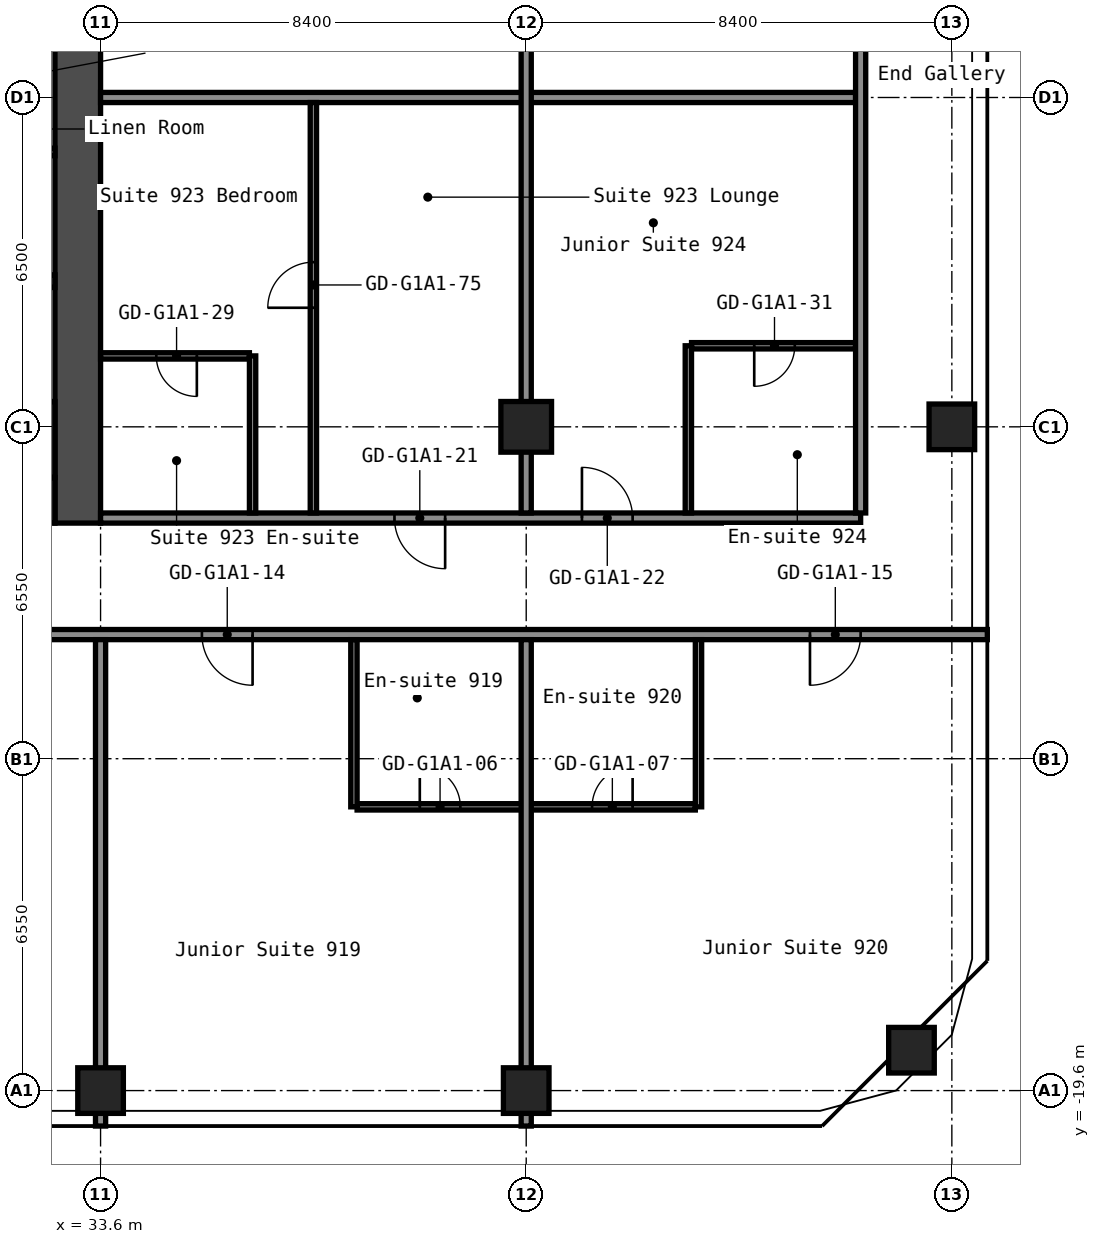
"""IFC4 building model, lengths in metres.
Left out: names, types, materials, properties, quantities, classifications, styles, units other than length and angle.
Written with IfcOpenShell. Run it as: python <this file> out.ifc"""

import sys

from ifc_helpers import new_model, si_unit, direction, frame, frame_2d, origin, origin_2d, place, context, subcontext, project, spatial, rectangle, hollow_rectangle, extrude, element, fill, save


model = new_model("IFC4")
c1 = context("Model", 3, precision=1e-05, world=origin(), true_north=direction((0.0, 1.0)))
c2 = subcontext(c1, "Body", "Model", "MODEL_VIEW")
j1 = project(units=[si_unit("LENGTHUNIT", "METRE"), si_unit("PLANEANGLEUNIT", "RADIAN")], contexts=[c1])
p1 = place(None, origin())
s1 = spatial("IfcSite", under=j1, at=p1, CompositionType="ELEMENT")
p2 = place(p1, origin())
s2 = spatial("IfcBuilding", under=s1, at=p2, CompositionType="ELEMENT")
p3 = place(p2, frame((0.0, 0.0, 35.8)))
s3 = spatial("IfcBuildingStorey", under=s2, at=p3, CompositionType="ELEMENT", Elevation=35.8)
for number, where, z_axis, x_axis in (
    (1, (33.6, -19.6, 0.0), (0.0, 0.0, 1.0), (1.0, 0.0, 0.0)),
    (2, (42.0, -19.6, 0.0), (0.0, 0.0, 1.0), (1.0, 0.0, 0.0)),
):
    element("IfcColumn", number, at=place(p3, frame(where, z_axis=z_axis, x_axis=x_axis)), inside=s3, PredefinedType="COLUMN", context=c2, shape_type="SweptSolid", body=[
        extrude(hollow_rectangle(XDim=0.9, YDim=0.9, WallThickness=0.036, at=origin_2d()), origin(), (0.0, 0.0, 1.0), 2.8),
    ])
p4 = place(p3, frame((42.0, -6.5, 0.0), z_axis=(0.0, 0.0, 1.0), x_axis=(1.0, 0.0, 0.0)))
e3 = element("IfcColumn", 3, at=p4, inside=s3, PredefinedType="COLUMN", context=c2, shape_type="SweptSolid", body=[
    extrude(hollow_rectangle(XDim=1.0, YDim=1.0, WallThickness=0.04, at=origin_2d()), origin(), (0.0, 0.0, 1.0), 2.8),
])
for number, where, z_axis, x_axis in (
    (4, (49.603, -18.803, 0.0), (0.0, 0.0, 1.0), (1.0, 0.0, 0.0)),
    (5, (50.4, -6.5, 0.0), (0.0, 0.0, 1.0), (1.0, 0.0, 0.0)),
):
    element("IfcColumn", number, at=place(p3, frame(where, z_axis=z_axis, x_axis=x_axis)), inside=s3, PredefinedType="COLUMN", context=c2, shape_type="SweptSolid", body=[
        extrude(hollow_rectangle(XDim=0.9, YDim=0.9, WallThickness=0.036, at=origin_2d()), origin(), (0.0, 0.0, 1.0), 2.8),
    ])
p5 = place(p3, frame((33.15, -8.4, 0.0), z_axis=(0.0, 0.0, 1.0), x_axis=(0.0, 1.0, 0.0)))
e6 = element("IfcWall", 6, at=p5, inside=s3, PredefinedType="SHEAR", context=c2, shape_type="SweptSolid", body=[
    extrude(rectangle(XDim=16.8, YDim=0.9, at=frame_2d((8.4, 0.0))), origin(), (0.0, 0.0, 1.0), 2.8),
])
p6 = place(p3, frame((17.7, -7.95, 0.0), z_axis=(0.0, 0.0, 1.0), x_axis=(1.0, 0.0, 0.0)))
e7 = element("IfcWall", 7, at=p6, inside=s3, PredefinedType="SHEAR", context=c2, shape_type="SweptSolid", body=[
    extrude(rectangle(XDim=15.0, YDim=0.9, at=frame_2d((7.5, 0.0))), origin(), (0.0, 0.0, 1.0), 2.8),
])
p7 = place(p6, frame((2.55, 0.0, 0.0)))
e8 = element("IfcOpeningElement", 8, at=p7, cuts=e7, PredefinedType="OPENING", context=c2, shape_type="SweptSolid", body=[
    extrude(rectangle(XDim=1.0, YDim=2.1, at=frame_2d((0.5, 1.05))), frame((0.0, 0.46, 0.0), z_axis=(0.0, -1.0, 0.0), x_axis=(1.0, 0.0, 0.0)), (0.0, 0.0, 1.0), 0.92),
])
p8 = place(p3, frame((28.15, -3.625, 0.0), z_axis=(0.0, 0.0, 1.0), x_axis=(1.0, 0.0, 0.0)))
e9 = element("IfcWall", 9, at=p8, inside=s3, PredefinedType="SHEAR", context=c2, shape_type="SweptSolid", body=[
    extrude(rectangle(XDim=4.55, YDim=0.25, at=frame_2d((2.275, 0.0))), origin(), (0.0, 0.0, 1.0), 2.8),
])
p9 = place(p3, frame((28.15, -6.75, 0.0), z_axis=(0.0, 0.0, 1.0), x_axis=(1.0, 0.0, 0.0)))
e10 = element("IfcWall", 10, at=p9, inside=s3, PredefinedType="SHEAR", context=c2, shape_type="SweptSolid", body=[
    extrude(rectangle(XDim=4.55, YDim=1.5, at=frame_2d((2.275, 0.0))), origin(), (0.0, 0.0, 1.0), 2.8),
])
p10 = place(p3, frame((29.7, -1.075, 0.0), z_axis=(0.0, 0.0, 1.0), x_axis=(1.0, 0.0, 0.0)))
e11 = element("IfcWall", 11, at=p10, inside=s3, PredefinedType="PARTITIONING", context=c2, shape_type="SweptSolid", body=[
    extrude(rectangle(XDim=3.0, YDim=0.15, at=frame_2d((1.5, 0.0))), origin(), (0.0, 0.0, 1.0), 2.8),
])
p11 = place(p3, frame((38.663, -14.0, 0.0), z_axis=(0.0, 0.0, 1.0), x_axis=(1.0, 0.0, 0.0)))
e12 = element("IfcWall", 12, at=p11, inside=s3, PredefinedType="PARTITIONING", context=c2, shape_type="SweptSolid", body=[
    extrude(rectangle(XDim=6.675, YDim=0.125, at=frame_2d((3.337, 0.0))), origin(), (0.0, 0.0, 1.0), 2.8),
])
p12 = place(p11, frame((1.238, 0.0, 0.0)))
e13 = element("IfcOpeningElement", 13, at=p12, cuts=e12, PredefinedType="OPENING", context=c2, shape_type="SweptSolid", body=[
    extrude(rectangle(XDim=0.8, YDim=2.1, at=frame_2d((0.4, 1.05))), frame((0.0, 0.073, 0.0), z_axis=(0.0, -1.0, 0.0), x_axis=(1.0, 0.0, 0.0)), (0.0, 0.0, 1.0), 0.145),
])
p13 = place(p11, frame((4.637, 0.0, 0.0)))
e14 = element("IfcOpeningElement", 14, at=p13, cuts=e12, PredefinedType="OPENING", context=c2, shape_type="SweptSolid", body=[
    extrude(rectangle(XDim=0.8, YDim=2.1, at=frame_2d((0.4, 1.05))), frame((0.0, 0.073, 0.0), z_axis=(0.0, -1.0, 0.0), x_axis=(1.0, 0.0, 0.0)), (0.0, 0.0, 1.0), 0.145),
])
p14 = place(p3, frame((16.8, -10.6, 0.0), z_axis=(0.0, 0.0, 1.0), x_axis=(1.0, 0.0, 0.0)))
e15 = element("IfcWall", 15, at=p14, inside=s3, PredefinedType="PARTITIONING", context=c2, shape_type="SweptSolid", body=[
    extrude(rectangle(XDim=34.3, YDim=0.2, at=frame_2d((17.15, 0.0))), origin(), (0.0, 0.0, 1.0), 2.8),
])
p15 = place(p14, frame((5.4, 0.0, 0.0)))
e16 = element("IfcOpeningElement", 16, at=p15, cuts=e15, PredefinedType="OPENING", context=c2, shape_type="SweptSolid", body=[
    extrude(rectangle(XDim=1.0, YDim=2.1, at=frame_2d((0.5, 1.05))), frame((0.0, 0.11, 0.0), z_axis=(0.0, -1.0, 0.0), x_axis=(1.0, 0.0, 0.0)), (0.0, 0.0, 1.0), 0.22),
])
p16 = place(p14, frame((13.8, 0.0, 0.0)))
e17 = element("IfcOpeningElement", 17, at=p16, cuts=e15, PredefinedType="OPENING", context=c2, shape_type="SweptSolid", body=[
    extrude(rectangle(XDim=1.0, YDim=2.1, at=frame_2d((0.5, 1.05))), frame((0.0, 0.11, 0.0), z_axis=(0.0, -1.0, 0.0), x_axis=(1.0, 0.0, 0.0)), (0.0, 0.0, 1.0), 0.22),
])
p17 = place(p14, frame((18.8, 0.0, 0.0)))
e18 = element("IfcOpeningElement", 18, at=p17, cuts=e15, PredefinedType="OPENING", context=c2, shape_type="SweptSolid", body=[
    extrude(rectangle(XDim=1.0, YDim=2.1, at=frame_2d((0.5, 1.05))), frame((0.0, 0.11, 0.0), z_axis=(0.0, -1.0, 0.0), x_axis=(1.0, 0.0, 0.0)), (0.0, 0.0, 1.0), 0.22),
])
p18 = place(p14, frame((30.8, 0.0, 0.0)))
e19 = element("IfcOpeningElement", 19, at=p18, cuts=e15, PredefinedType="OPENING", context=c2, shape_type="SweptSolid", body=[
    extrude(rectangle(XDim=1.0, YDim=2.1, at=frame_2d((0.5, 1.05))), frame((0.0, 0.11, 0.0), z_axis=(0.0, -1.0, 0.0), x_axis=(1.0, 0.0, 0.0)), (0.0, 0.0, 1.0), 0.22),
])
p19 = place(p3, frame((33.6, -8.3, 0.0), z_axis=(0.0, 0.0, 1.0), x_axis=(1.0, 0.0, 0.0)))
e20 = element("IfcWall", 20, at=p19, inside=s3, PredefinedType="PARTITIONING", context=c2, shape_type="SweptSolid", body=[
    extrude(rectangle(XDim=15.0, YDim=0.2, at=frame_2d((7.5, 0.0))), origin(), (0.0, 0.0, 1.0), 2.8),
])
p20 = place(p19, frame((5.8, 0.0, 0.0)))
e21 = element("IfcOpeningElement", 21, at=p20, cuts=e20, PredefinedType="OPENING", context=c2, shape_type="SweptSolid", body=[
    extrude(rectangle(XDim=1.0, YDim=2.1, at=frame_2d((0.5, 1.05))), frame((0.0, 0.11, 0.0), z_axis=(0.0, -1.0, 0.0), x_axis=(1.0, 0.0, 0.0)), (0.0, 0.0, 1.0), 0.22),
])
p21 = place(p19, frame((9.5, 0.0, 0.0)))
e22 = element("IfcOpeningElement", 22, at=p21, cuts=e20, PredefinedType="OPENING", context=c2, shape_type="SweptSolid", body=[
    extrude(rectangle(XDim=1.0, YDim=2.1, at=frame_2d((0.5, 1.05))), frame((0.0, 0.11, 0.0), z_axis=(0.0, -1.0, 0.0), x_axis=(1.0, 0.0, 0.0)), (0.0, 0.0, 1.0), 0.22),
])
p22 = place(p3, frame((33.6, -5.1, 0.0), z_axis=(0.0, 0.0, 1.0), x_axis=(1.0, 0.0, 0.0)))
e23 = element("IfcWall", 23, at=p22, inside=s3, PredefinedType="PARTITIONING", context=c2, shape_type="SweptSolid", body=[
    extrude(rectangle(XDim=2.938, YDim=0.125, at=frame_2d((1.469, 0.0))), origin(), (0.0, 0.0, 1.0), 2.8),
])
p23 = place(p22, frame((1.1, 0.0, 0.0)))
e24 = element("IfcOpeningElement", 24, at=p23, cuts=e23, PredefinedType="OPENING", context=c2, shape_type="SweptSolid", body=[
    extrude(rectangle(XDim=0.8, YDim=2.1, at=frame_2d((0.4, 1.05))), frame((0.0, 0.073, 0.0), z_axis=(0.0, -1.0, 0.0), x_axis=(1.0, 0.0, 0.0)), (0.0, 0.0, 1.0), 0.145),
])
p24 = place(p3, frame((45.262, -4.9, 0.0), z_axis=(0.0, 0.0, 1.0), x_axis=(1.0, 0.0, 0.0)))
e25 = element("IfcWall", 25, at=p24, inside=s3, PredefinedType="PARTITIONING", context=c2, shape_type="SweptSolid", body=[
    extrude(rectangle(XDim=3.238, YDim=0.125, at=frame_2d((1.619, 0.0))), origin(), (0.0, 0.0, 1.0), 2.8),
])
p25 = place(p24, frame((1.238, 0.0, 0.0)))
e26 = element("IfcOpeningElement", 26, at=p25, cuts=e25, PredefinedType="OPENING", context=c2, shape_type="SweptSolid", body=[
    extrude(rectangle(XDim=0.8, YDim=2.1, at=frame_2d((0.4, 1.05))), frame((0.0, 0.073, 0.0), z_axis=(0.0, -1.0, 0.0), x_axis=(1.0, 0.0, 0.0)), (0.0, 0.0, 1.0), 0.145),
])
p26 = place(p3, frame((33.6, 0.0, 0.0), z_axis=(0.0, 0.0, 1.0), x_axis=(1.0, 0.0, 0.0)))
e27 = element("IfcWall", 27, at=p26, inside=s3, PredefinedType="PARTITIONING", context=c2, shape_type="SweptSolid", body=[
    extrude(rectangle(XDim=14.9, YDim=0.2, at=frame_2d((7.45, 0.0))), origin(), (0.0, 0.0, 1.0), 2.8),
])
p27 = place(p3, frame((33.6, -20.3, 0.0), z_axis=(0.0, 0.0, 1.0), x_axis=(0.0, 1.0, 0.0)))
e28 = element("IfcWall", 28, at=p27, inside=s3, PredefinedType="PARTITIONING", context=c2, shape_type="SweptSolid", body=[
    extrude(rectangle(XDim=9.6, YDim=0.2, at=frame_2d((4.8, 0.0))), origin(), (0.0, 0.0, 1.0), 2.8),
])
p28 = place(p3, frame((36.6, -8.2, 0.0), z_axis=(0.0, 0.0, 1.0), x_axis=(0.0, 1.0, 0.0)))
e29 = element("IfcWall", 29, at=p28, inside=s3, PredefinedType="PARTITIONING", context=c2, shape_type="SweptSolid", body=[
    extrude(rectangle(XDim=3.1, YDim=0.125, at=frame_2d((1.55, 0.0))), origin(), (0.0, 0.0, 1.0), 2.8),
])
p29 = place(p3, frame((37.8, -8.2, 0.0), z_axis=(0.0, 0.0, 1.0), x_axis=(0.0, 1.0, 0.0)))
e30 = element("IfcWall", 30, at=p29, inside=s3, PredefinedType="PARTITIONING", context=c2, shape_type="SweptSolid", body=[
    extrude(rectangle(XDim=8.1, YDim=0.125, at=frame_2d((4.05, 0.0))), origin(), (0.0, 0.0, 1.0), 2.8),
])
p30 = place(p29, frame((4.05, 0.0, 0.0)))
e31 = element("IfcOpeningElement", 31, at=p30, cuts=e30, PredefinedType="OPENING", context=c2, shape_type="SweptSolid", body=[
    extrude(rectangle(XDim=0.9, YDim=2.1, at=frame_2d((0.45, 1.05))), frame((0.0, 0.073, 0.0), z_axis=(0.0, -1.0, 0.0), x_axis=(1.0, 0.0, 0.0)), (0.0, 0.0, 1.0), 0.145),
])
p31 = place(p3, frame((38.6, -14.0, 0.0), z_axis=(0.0, 0.0, 1.0), x_axis=(0.0, 1.0, 0.0)))
e32 = element("IfcWall", 32, at=p31, inside=s3, PredefinedType="PARTITIONING", context=c2, shape_type="SweptSolid", body=[
    extrude(rectangle(XDim=3.3, YDim=0.125, at=frame_2d((1.65, 0.0))), origin(), (0.0, 0.0, 1.0), 2.8),
])
p32 = place(p3, frame((42.0, -20.3, 0.0), z_axis=(0.0, 0.0, 1.0), x_axis=(0.0, 1.0, 0.0)))
e33 = element("IfcWall", 33, at=p32, inside=s3, PredefinedType="PARTITIONING", context=c2, shape_type="SweptSolid", body=[
    extrude(rectangle(XDim=9.6, YDim=0.2, at=frame_2d((4.8, 0.0))), origin(), (0.0, 0.0, 1.0), 2.8),
])
p33 = place(p3, frame((42.0, -8.2, 0.0), z_axis=(0.0, 0.0, 1.0), x_axis=(0.0, 1.0, 0.0)))
e34 = element("IfcWall", 34, at=p33, inside=s3, PredefinedType="PARTITIONING", context=c2, shape_type="SweptSolid", body=[
    extrude(rectangle(XDim=16.4, YDim=0.2, at=frame_2d((8.2, 0.0))), origin(), (0.0, 0.0, 1.0), 2.8),
])
for number, where, z_axis, x_axis in (
    (35, (45.2, -8.2, 0.0), (0.0, 0.0, 1.0), (0.0, 1.0, 0.0)),
    (36, (45.4, -14.0, 0.0), (0.0, 0.0, 1.0), (0.0, 1.0, 0.0)),
):
    element("IfcWall", number, at=place(p3, frame(where, z_axis=z_axis, x_axis=x_axis)), inside=s3, PredefinedType="PARTITIONING", context=c2, shape_type="SweptSolid", body=[
        extrude(rectangle(XDim=3.3, YDim=0.125, at=frame_2d((1.65, 0.0))), origin(), (0.0, 0.0, 1.0), 2.8),
    ])
p34 = place(p3, frame((48.6, -8.2, 0.0), z_axis=(0.0, 0.0, 1.0), x_axis=(0.0, 1.0, 0.0)))
e37 = element("IfcWall", 37, at=p34, inside=s3, PredefinedType="PARTITIONING", context=c2, shape_type="SweptSolid", body=[
    extrude(rectangle(XDim=16.4, YDim=0.2, at=frame_2d((8.2, 0.0))), origin(), (0.0, 0.0, 1.0), 2.8),
])
p35 = place(p12, origin())
e38 = element("IfcDoor", 38, at=p35, inside=s3, OperationType="SINGLE_SWING_RIGHT", PredefinedType="DOOR", context=c2, shape_type="SweptSolid", body=[
    extrude(rectangle(XDim=0.8, YDim=2.1, at=frame_2d((0.4, 1.05))), frame((0.0, 0.025, 0.0), z_axis=(0.0, -1.0, 0.0), x_axis=(1.0, 0.0, 0.0)), (0.0, 0.0, 1.0), 0.05),
])
fill(e13, e38)
p36 = place(p13, origin())
e39 = element("IfcDoor", 39, at=p36, inside=s3, OperationType="SINGLE_SWING_LEFT", PredefinedType="DOOR", context=c2, shape_type="SweptSolid", body=[
    extrude(rectangle(XDim=0.8, YDim=2.1, at=frame_2d((0.4, 1.05))), frame((0.0, 0.025, 0.0), z_axis=(0.0, -1.0, 0.0), x_axis=(1.0, 0.0, 0.0)), (0.0, 0.0, 1.0), 0.05),
])
fill(e14, e39)
p37 = place(p17, origin())
e40 = element("IfcDoor", 40, at=p37, inside=s3, OperationType="SINGLE_SWING_RIGHT", PredefinedType="DOOR", context=c2, shape_type="SweptSolid", body=[
    extrude(rectangle(XDim=1.0, YDim=2.1, at=frame_2d((0.5, 1.05))), frame((0.0, 0.025, 0.0), z_axis=(0.0, -1.0, 0.0), x_axis=(1.0, 0.0, 0.0)), (0.0, 0.0, 1.0), 0.05),
])
fill(e18, e40)
p38 = place(p18, origin())
e41 = element("IfcDoor", 41, at=p38, inside=s3, OperationType="SINGLE_SWING_LEFT", PredefinedType="DOOR", context=c2, shape_type="SweptSolid", body=[
    extrude(rectangle(XDim=1.0, YDim=2.1, at=frame_2d((0.5, 1.05))), frame((0.0, 0.025, 0.0), z_axis=(0.0, -1.0, 0.0), x_axis=(1.0, 0.0, 0.0)), (0.0, 0.0, 1.0), 0.05),
])
fill(e19, e41)
p39 = place(p20, origin())
e42 = element("IfcDoor", 42, at=p39, inside=s3, OperationType="SINGLE_SWING_RIGHT", PredefinedType="DOOR", context=c2, shape_type="SweptSolid", body=[
    extrude(rectangle(XDim=1.0, YDim=2.1, at=frame_2d((0.5, 1.05))), frame((0.0, 0.025, 0.0), z_axis=(0.0, -1.0, 0.0), x_axis=(1.0, 0.0, 0.0)), (0.0, 0.0, 1.0), 0.05),
])
fill(e21, e42)
p40 = place(p21, origin())
e43 = element("IfcDoor", 43, at=p40, inside=s3, OperationType="SINGLE_SWING_RIGHT", PredefinedType="DOOR", context=c2, shape_type="SweptSolid", body=[
    extrude(rectangle(XDim=1.0, YDim=2.1, at=frame_2d((0.5, 1.05))), frame((0.0, 0.025, 0.0), z_axis=(0.0, -1.0, 0.0), x_axis=(1.0, 0.0, 0.0)), (0.0, 0.0, 1.0), 0.05),
])
fill(e22, e43)
p41 = place(p23, origin())
e44 = element("IfcDoor", 44, at=p41, inside=s3, OperationType="SINGLE_SWING_RIGHT", PredefinedType="DOOR", context=c2, shape_type="SweptSolid", body=[
    extrude(rectangle(XDim=0.8, YDim=2.1, at=frame_2d((0.4, 1.05))), frame((0.0, 0.025, 0.0), z_axis=(0.0, -1.0, 0.0), x_axis=(1.0, 0.0, 0.0)), (0.0, 0.0, 1.0), 0.05),
])
fill(e24, e44)
p42 = place(p25, origin())
e45 = element("IfcDoor", 45, at=p42, inside=s3, OperationType="SINGLE_SWING_LEFT", PredefinedType="DOOR", context=c2, shape_type="SweptSolid", body=[
    extrude(rectangle(XDim=0.8, YDim=2.1, at=frame_2d((0.4, 1.05))), frame((0.0, 0.025, 0.0), z_axis=(0.0, -1.0, 0.0), x_axis=(1.0, 0.0, 0.0)), (0.0, 0.0, 1.0), 0.05),
])
fill(e26, e45)
p43 = place(p30, origin())
e46 = element("IfcDoor", 46, at=p43, inside=s3, OperationType="SINGLE_SWING_RIGHT", PredefinedType="DOOR", context=c2, shape_type="SweptSolid", body=[
    extrude(rectangle(XDim=0.9, YDim=2.1, at=frame_2d((0.45, 1.05))), frame((0.0, 0.025, 0.0), z_axis=(0.0, -1.0, 0.0), x_axis=(1.0, 0.0, 0.0)), (0.0, 0.0, 1.0), 0.05),
])
fill(e31, e46)
save(model, sys.argv[1])
